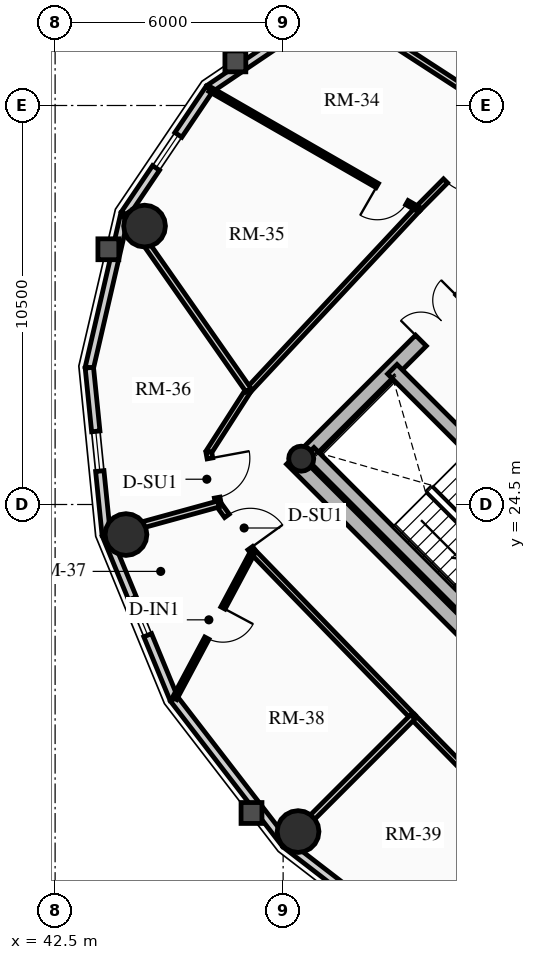
"""IFC4 building model, lengths in metres.
Left out: names, types, materials, properties, quantities, classifications, styles, units other than length and angle.
Written with IfcOpenShell. Run it as: python <this file> out.ifc"""

import sys

from ifc_helpers import new_model, si_unit, direction, frame, frame_2d, origin, origin_2d, place, context, subcontext, project, spatial, rectangle, circle, hollow_circle, extrude, source, transform, mapped, element, fill, save


model = new_model("IFC4")
c1 = context("Model", 3, precision=1e-05, world=origin(), true_north=direction((0.0, 1.0)))
c2 = subcontext(c1, "Body", "Model", "MODEL_VIEW")
j1 = project(units=[si_unit("LENGTHUNIT", "METRE"), si_unit("PLANEANGLEUNIT", "RADIAN")], contexts=[c1])
p1 = place(None, origin())
s1 = spatial("IfcSite", under=j1, at=p1, CompositionType="ELEMENT")
p2 = place(p1, origin())
s2 = spatial("IfcBuilding", under=s1, at=p2, CompositionType="ELEMENT")
p3 = place(p2, frame((0.0, 0.0, 211.21)))
s3 = spatial("IfcBuildingStorey", under=s2, at=p3, CompositionType="ELEMENT", Elevation=211.21)
p4 = place(p3, frame((58.702, 15.732, 0.0), z_axis=(0.0, 0.0, 1.0), x_axis=(-0.707106781187, 0.707106781187, 0.0)))
e1 = element("IfcWall", 1, at=p4, inside=s3, PredefinedType="SHEAR", context=c2, shape_type="SweptSolid", body=[
    extrude(rectangle(XDim=14.1, YDim=0.4, at=frame_2d((7.05, 0.0))), origin(), (0.0, 0.0, 1.0), 2.91),
])
p5 = place(p3, frame((48.873, 25.561, 0.0), z_axis=(0.0, 0.0, 1.0), x_axis=(0.707106781187, 0.707106781187, 0.0)))
e2 = element("IfcWall", 2, at=p5, inside=s3, PredefinedType="SHEAR", context=c2, shape_type="SweptSolid", body=[
    extrude(rectangle(XDim=10.7, YDim=0.4, at=frame_2d((5.35, 0.0))), origin(), (0.0, 0.0, 1.0), 2.91),
])
m1 = source(origin(), c2, "Body", "SweptSolid", [
    extrude(rectangle(XDim=1.5, YDim=2.02, at=frame_2d((0.75, 1.01))), frame((0.0, 0.21, 0.0), z_axis=(0.0, -1.0, 0.0), x_axis=(1.0, 0.0, 0.0)), (0.0, 0.0, 1.0), 0.42),
])
p6 = place(p5, frame((4.6, 0.0, 0.0)))
e3 = element("IfcOpeningElement", 3, at=p6, cuts=e2, PredefinedType="OPENING", context=c2, shape_type="MappedRepresentation", body=[
    mapped(m1, transform((0.0, 0.0, 0.0), x_axis=(1.0, 0.0, 0.0), y_axis=(0.0, 1.0, 0.0), z_axis=(0.0, 0.0, 1.0), scale=1.0)),
])
p7 = place(p3, frame((61.06, 18.373, 0.0), z_axis=(0.0, 0.0, 1.0), x_axis=(-0.707106781187, 0.707106781187, 0.0)))
e4 = element("IfcWall", 4, at=p7, inside=s3, PredefinedType="SHEAR", context=c2, shape_type="SweptSolid", body=[
    extrude(rectangle(XDim=13.7, YDim=0.35, at=frame_2d((6.85, 0.0))), origin(), (0.0, 0.0, 1.0), 2.91),
])
m2 = source(origin(), c2, "Body", "SweptSolid", [
    extrude(rectangle(XDim=1.1, YDim=2.015, at=frame_2d((0.55, 1.007))), frame((0.0, 0.185, 0.0), z_axis=(0.0, -1.0, 0.0), x_axis=(1.0, 0.0, 0.0)), (0.0, 0.0, 1.0), 0.37),
])
p8 = place(p7, frame((4.85, 0.0, 0.0)))
e5 = element("IfcOpeningElement", 5, at=p8, cuts=e4, PredefinedType="OPENING", context=c2, shape_type="MappedRepresentation", body=[
    mapped(m2, transform((0.0, 0.0, 0.0), x_axis=(1.0, 0.0, 0.0), y_axis=(0.0, 1.0, 0.0), z_axis=(0.0, 0.0, 1.0), scale=1.0)),
])
p9 = place(p7, frame((0.625, 0.0, 0.0)))
e6 = element("IfcOpeningElement", 6, at=p9, cuts=e4, PredefinedType="OPENING", context=c2, shape_type="MappedRepresentation", body=[
    mapped(m2, transform((0.0, 0.0, 0.0), x_axis=(1.0, 0.0, 0.0), y_axis=(0.0, 1.0, 0.0), z_axis=(0.0, 0.0, 1.0), scale=1.0)),
])
p10 = place(p7, frame((2.625, 0.0, 0.0)))
e7 = element("IfcOpeningElement", 7, at=p10, cuts=e4, PredefinedType="OPENING", context=c2, shape_type="MappedRepresentation", body=[
    mapped(m2, transform((0.0, 0.0, 0.0), x_axis=(1.0, 0.0, 0.0), y_axis=(0.0, 1.0, 0.0), z_axis=(0.0, 0.0, 1.0), scale=1.0)),
])
m3 = source(origin(), c2, "Body", "SweptSolid", [
    extrude(rectangle(XDim=1.15, YDim=2.02, at=frame_2d((0.575, 1.01))), frame((0.0, 0.185, 0.0), z_axis=(0.0, -1.0, 0.0), x_axis=(1.0, 0.0, 0.0)), (0.0, 0.0, 1.0), 0.37),
])
p11 = place(p7, frame((7.27, 0.0, 0.0)))
e8 = element("IfcOpeningElement", 8, at=p11, cuts=e4, PredefinedType="OPENING", context=c2, shape_type="MappedRepresentation", body=[
    mapped(m3, transform((0.0, 0.0, 0.0), x_axis=(1.0, 0.0, 0.0), y_axis=(0.0, 1.0, 0.0), z_axis=(0.0, 0.0, 1.0), scale=1.0)),
])
p12 = place(p3, frame((53.922, 21.141, 0.0), z_axis=(0.0, 0.0, 1.0), x_axis=(-0.707106781187, 0.707106781187, 0.0)))
e9 = element("IfcWall", 9, at=p12, inside=s3, PredefinedType="SHEAR", context=c2, shape_type="SweptSolid", body=[
    extrude(rectangle(XDim=6.695, YDim=0.35, at=frame_2d((3.348, 0.0))), origin(), (0.0, 0.0, 1.0), 2.91),
])
p13 = place(p3, frame((48.976, 25.706, 0.0), z_axis=(0.0, 0.0, 1.0), x_axis=(0.707106781187, 0.707106781187, 0.0)))
e10 = element("IfcColumn", 10, at=p13, inside=s3, PredefinedType="COLUMN", context=c2, shape_type="SweptSolid", body=[
    extrude(hollow_circle(Radius=0.33, WallThickness=0.025, at=origin_2d()), origin(), (0.0, 0.0, 1.0), 2.91),
])
for number, where, z_axis, x_axis in (
    (11, (44.854, 31.827, 0.0), (0.0, 0.0, 1.0), (1.0, 0.0, 0.0)),
    (12, (44.365, 23.709, 0.0), (0.0, 0.0, 1.0), (1.0, 0.0, 0.0)),
    (13, (48.893, 15.893, 0.0), (0.0, 0.0, 1.0), (1.0, 0.0, 0.0)),
):
    element("IfcColumn", number, at=place(p3, frame(where, z_axis=z_axis, x_axis=x_axis)), inside=s3, PredefinedType="USERDEFINED", context=c2, shape_type="SweptSolid", body=[
        extrude(circle(Radius=0.55, at=origin_2d()), origin(), (0.0, 0.0, 1.0), 2.91),
    ])
p14 = place(p3, frame((46.561, 35.439, 0.0), z_axis=(0.0, 0.0, 1.0), x_axis=(0.828833723692, 0.559495003079, 0.0)))
e14 = element("IfcWall", 14, at=p14, inside=s3, PredefinedType="SOLIDWALL", context=c2, shape_type="SweptSolid", body=[
    extrude(rectangle(XDim=3.976, YDim=0.22, at=frame_2d((1.988, 0.0))), origin(), (0.0, 0.0, 1.0), 2.322),
])
p15 = place(p3, frame((44.337, 32.144, 0.0), z_axis=(0.0, 0.0, 1.0), x_axis=(0.559495003079, 0.828833723692, 0.0)))
e15 = element("IfcWall", 15, at=p15, inside=s3, PredefinedType="SOLIDWALL", context=c2, shape_type="SweptSolid", body=[
    extrude(rectangle(XDim=3.976, YDim=0.22, at=frame_2d((1.988, 0.0))), origin(), (0.0, 0.0, 1.0), 2.322),
])
m4 = source(origin(), c2, "Body", "SweptSolid", [
    extrude(rectangle(XDim=1.05, YDim=1.3, at=frame_2d((0.525, 0.65))), frame((0.0, 0.12, 0.0), z_axis=(0.0, -1.0, 0.0), x_axis=(1.0, 0.0, 0.0)), (0.0, 0.0, 1.0), 0.24),
])
p16 = place(p15, frame((1.463, 0.0, 0.65)))
e16 = element("IfcOpeningElement", 16, at=p16, cuts=e15, PredefinedType="OPENING", context=c2, shape_type="MappedRepresentation", body=[
    mapped(m4, transform((0.0, 0.0, 0.0), x_axis=(1.0, 0.0, 0.0), y_axis=(0.0, 1.0, 0.0), z_axis=(0.0, 0.0, 1.0), scale=1.0)),
])
p17 = place(p3, frame((43.401, 28.1, 0.0), z_axis=(0.0, 0.0, 1.0), x_axis=(0.225473813158, 0.974249228678, 0.0)))
e17 = element("IfcWall", 17, at=p17, inside=s3, PredefinedType="SOLIDWALL", context=c2, shape_type="SweptSolid", body=[
    extrude(rectangle(XDim=4.15, YDim=0.22, at=frame_2d((2.075, 0.0))), origin(), (0.0, 0.0, 1.0), 2.322),
])
p18 = place(p3, frame((43.845, 23.705, 0.0), z_axis=(0.0, 0.0, 1.0), x_axis=(-0.100570534541, 0.994929930991, 0.0)))
e18 = element("IfcWall", 18, at=p18, inside=s3, PredefinedType="SOLIDWALL", context=c2, shape_type="SweptSolid", body=[
    extrude(rectangle(XDim=4.418, YDim=0.22, at=frame_2d((2.209, 0.0))), origin(), (0.0, 0.0, 1.0), 2.322),
])
p19 = place(p18, frame((1.684, 0.0, 0.65)))
e19 = element("IfcOpeningElement", 19, at=p19, cuts=e18, PredefinedType="OPENING", context=c2, shape_type="MappedRepresentation", body=[
    mapped(m4, transform((0.0, 0.0, 0.0), x_axis=(1.0, 0.0, 0.0), y_axis=(0.0, 1.0, 0.0), z_axis=(0.0, 0.0, 1.0), scale=1.0)),
])
p20 = place(p3, frame((45.626, 19.387, 0.0), z_axis=(0.0, 0.0, 1.0), x_axis=(-0.381309704956, 0.924447353237, 0.0)))
e20 = element("IfcWall", 20, at=p20, inside=s3, PredefinedType="SOLIDWALL", context=c2, shape_type="SweptSolid", body=[
    extrude(rectangle(XDim=4.671, YDim=0.22, at=frame_2d((2.335, 0.0))), origin(), (0.0, 0.0, 1.0), 2.322),
])
p21 = place(p20, frame((1.81, 0.0, 0.65)))
e21 = element("IfcOpeningElement", 21, at=p21, cuts=e20, PredefinedType="OPENING", context=c2, shape_type="MappedRepresentation", body=[
    mapped(m4, transform((0.0, 0.0, 0.0), x_axis=(1.0, 0.0, 0.0), y_axis=(0.0, 1.0, 0.0), z_axis=(0.0, 0.0, 1.0), scale=1.0)),
])
p22 = place(p3, frame((48.569, 15.569, 0.0), z_axis=(0.0, 0.0, 1.0), x_axis=(-0.610523083886, 0.791998462147, 0.0)))
e22 = element("IfcWall", 22, at=p22, inside=s3, PredefinedType="SOLIDWALL", context=c2, shape_type="SweptSolid", body=[
    extrude(rectangle(XDim=4.82, YDim=0.22, at=frame_2d((2.41, 0.0))), origin(), (0.0, 0.0, 1.0), 2.322),
])
p23 = place(p3, frame((52.387, 12.626, 0.0), z_axis=(0.0, 0.0, 1.0), x_axis=(-0.791998462147, 0.610523083886, 0.0)))
e23 = element("IfcWall", 23, at=p23, inside=s3, PredefinedType="SOLIDWALL", context=c2, shape_type="SweptSolid", body=[
    extrude(rectangle(XDim=4.82, YDim=0.22, at=frame_2d((2.41, 0.0))), origin(), (0.0, 0.0, 1.0), 2.322),
])
p24 = place(p23, frame((1.885, 0.0, 0.65)))
e24 = element("IfcOpeningElement", 24, at=p24, cuts=e23, PredefinedType="OPENING", context=c2, shape_type="MappedRepresentation", body=[
    mapped(m4, transform((0.0, 0.0, 0.0), x_axis=(1.0, 0.0, 0.0), y_axis=(0.0, 1.0, 0.0), z_axis=(0.0, 0.0, 1.0), scale=1.0)),
])
p25 = place(p3, frame((54.427, 34.683, 0.0), z_axis=(0.0, 0.0, 1.0), x_axis=(-0.704178989986, -0.710022499687, 0.0)))
e25 = element("IfcWall", 25, at=p25, inside=s3, PredefinedType="PARTITIONING", context=c2, shape_type="SweptSolid", body=[
    extrude(rectangle(XDim=3.384, YDim=0.15, at=frame_2d((1.692, 0.0))), origin(), (0.0, 0.0, 1.0), 2.322),
])
m5 = source(origin(), c2, "Body", "SweptSolid", [
    extrude(rectangle(XDim=1.05, YDim=2.015, at=frame_2d((0.525, 1.007))), frame((0.0, 0.085, 0.0), z_axis=(0.0, -1.0, 0.0), x_axis=(1.0, 0.0, 0.0)), (0.0, 0.0, 1.0), 0.17),
])
p26 = place(p25, frame((1.298, 0.0, 0.0)))
e26 = element("IfcOpeningElement", 26, at=p26, cuts=e25, PredefinedType="OPENING", context=c2, shape_type="MappedRepresentation", body=[
    mapped(m5, transform((0.0, 0.0, 0.0), x_axis=(1.0, 0.0, 0.0), y_axis=(0.0, 1.0, 0.0), z_axis=(0.0, 0.0, 1.0), scale=1.0)),
])
p27 = place(p3, frame((52.043, 32.28, 0.0), z_axis=(0.0, 0.0, 1.0), x_axis=(-0.682606081633, -0.730786519661, 0.0)))
e27 = element("IfcWall", 27, at=p27, inside=s3, PredefinedType="PARTITIONING", context=c2, shape_type="SweptSolid", body=[
    extrude(rectangle(XDim=6.527, YDim=0.15, at=frame_2d((3.263, 0.0))), origin(), (0.0, 0.0, 1.0), 2.255),
])
p28 = place(p3, frame((47.588, 27.51, 0.0), z_axis=(0.0, 0.0, 1.0), x_axis=(-0.540202619347, -0.841534984449, 0.0)))
e28 = element("IfcWall", 28, at=p28, inside=s3, PredefinedType="PARTITIONING", context=c2, shape_type="SweptSolid", body=[
    extrude(rectangle(XDim=1.935, YDim=0.15, at=frame_2d((0.967, 0.0))), origin(), (0.0, 0.0, 1.0), 2.255),
])
p29 = place(p3, frame((46.543, 25.882, 0.0), z_axis=(0.0, 0.0, 1.0), x_axis=(0.181153502579, -0.983454832976, 0.0)))
e29 = element("IfcWall", 29, at=p29, inside=s3, PredefinedType="PARTITIONING", context=c2, shape_type="SweptSolid", body=[
    extrude(rectangle(XDim=1.392, YDim=0.15, at=frame_2d((0.696, 0.0))), origin(), (0.0, 0.0, 1.0), 2.322),
])
p30 = place(p29, frame((0.171, 0.0, 0.0)))
e30 = element("IfcOpeningElement", 30, at=p30, cuts=e29, PredefinedType="OPENING", context=c2, shape_type="MappedRepresentation", body=[
    mapped(m5, transform((0.0, 0.0, 0.0), x_axis=(1.0, 0.0, 0.0), y_axis=(0.0, 1.0, 0.0), z_axis=(0.0, 0.0, 1.0), scale=1.0)),
])
p31 = place(p3, frame((46.795, 24.513, 0.0), z_axis=(0.0, 0.0, 1.0), x_axis=(0.585628197524, -0.810579801294, 0.0)))
e31 = element("IfcWall", 31, at=p31, inside=s3, PredefinedType="PARTITIONING", context=c2, shape_type="SweptSolid", body=[
    extrude(rectangle(XDim=1.554, YDim=0.15, at=frame_2d((0.777, 0.0))), origin(), (0.0, 0.0, 1.0), 2.255),
])
p32 = place(p31, frame((0.384, 0.0, 0.0)))
e32 = element("IfcOpeningElement", 32, at=p32, cuts=e31, PredefinedType="OPENING", context=c2, shape_type="MappedRepresentation", body=[
    mapped(m5, transform((0.0, 0.0, 0.0), x_axis=(1.0, 0.0, 0.0), y_axis=(0.0, 1.0, 0.0), z_axis=(0.0, 0.0, 1.0), scale=1.0)),
])
p33 = place(p3, frame((47.706, 23.253, 0.0), z_axis=(0.0, 0.0, 1.0), x_axis=(0.696179266346, -0.717867974707, 0.0)))
e33 = element("IfcWall", 33, at=p33, inside=s3, PredefinedType="PARTITIONING", context=c2, shape_type="SweptSolid", body=[
    extrude(rectangle(XDim=6.045, YDim=0.15, at=frame_2d((3.022, 0.0))), origin(), (0.0, 0.0, 1.0), 2.255),
])
p34 = place(p3, frame((51.914, 18.914, 0.0), z_axis=(0.0, 0.0, 1.0), x_axis=(0.699999313799, -0.714143515465, 0.0)))
e34 = element("IfcWall", 34, at=p34, inside=s3, PredefinedType="PARTITIONING", context=c2, shape_type="SweptSolid", body=[
    extrude(rectangle(XDim=6.162, YDim=0.15, at=frame_2d((3.081, 0.0))), origin(), (0.0, 0.0, 1.0), 2.255),
])
p35 = place(p3, frame((54.427, 34.683, 0.0), z_axis=(0.0, 0.0, 1.0), x_axis=(-0.83860663594, 0.544737469023, 0.0)))
e35 = element("IfcWall", 35, at=p35, inside=s3, PredefinedType="PARTITIONING", context=c2, shape_type="SweptSolid", body=[
    extrude(rectangle(XDim=5.439, YDim=0.16, at=frame_2d((2.72, 0.0))), origin(), (0.0, 0.0, 1.0), 2.322),
])
p36 = place(p3, frame((47.588, 27.51, 0.0), z_axis=(0.0, 0.0, 1.0), x_axis=(-0.573073195236, 0.819504187239, 0.0)))
e36 = element("IfcWall", 36, at=p36, inside=s3, PredefinedType="PARTITIONING", context=c2, shape_type="SweptSolid", body=[
    extrude(rectangle(XDim=5.643, YDim=0.16, at=frame_2d((2.822, 0.0))), origin(), (0.0, 0.0, 1.0), 2.322),
])
p37 = place(p3, frame((46.795, 24.513, 0.0), z_axis=(0.0, 0.0, 1.0), x_axis=(-0.964263392178, -0.264945485912, 0.0)))
e37 = element("IfcWall", 37, at=p37, inside=s3, PredefinedType="PARTITIONING", context=c2, shape_type="SweptSolid", body=[
    extrude(rectangle(XDim=3.039, YDim=0.16, at=frame_2d((1.52, 0.0))), origin(), (0.0, 0.0, 1.0), 2.322),
])
p38 = place(p3, frame((51.914, 18.914, 0.0), z_axis=(0.0, 0.0, 1.0), x_axis=(-0.707106781187, -0.707106781187, 0.0)))
e38 = element("IfcWall", 38, at=p38, inside=s3, PredefinedType="PARTITIONING", context=c2, shape_type="SweptSolid", body=[
    extrude(rectangle(XDim=4.71, YDim=0.16, at=frame_2d((2.355, 0.0))), origin(), (0.0, 0.0, 1.0), 2.322),
])
p39 = place(p3, frame((52.043, 32.28, 0.0), z_axis=(0.0, 0.0, 1.0), x_axis=(-0.866853616581, 0.498562741709, 0.0)))
e39 = element("IfcWall", 39, at=p39, inside=s3, PredefinedType="PARTITIONING", context=c2, shape_type="SweptSolid", body=[
    extrude(rectangle(XDim=6.308, YDim=0.125, at=frame_2d((3.154, 0.0))), origin(), (0.0, 0.0, 1.0), 2.322),
])
m6 = source(origin(), c2, "Body", "SweptSolid", [
    extrude(rectangle(XDim=0.9, YDim=2.005, at=frame_2d((0.45, 1.002))), frame((0.0, 0.073, 0.0), z_axis=(0.0, -1.0, 0.0), x_axis=(1.0, 0.0, 0.0)), (0.0, 0.0, 1.0), 0.145),
])
p40 = place(p39, frame((0.33, 0.0, 0.0)))
e40 = element("IfcOpeningElement", 40, at=p40, cuts=e39, PredefinedType="OPENING", context=c2, shape_type="MappedRepresentation", body=[
    mapped(m6, transform((0.0, 0.0, 0.0), x_axis=(1.0, 0.0, 0.0), y_axis=(0.0, 1.0, 0.0), z_axis=(0.0, 0.0, 1.0), scale=1.0)),
])
p41 = place(p3, frame((47.706, 23.253, 0.0), z_axis=(0.0, 0.0, 1.0), x_axis=(-0.471384756618, -0.881927667799, 0.0)))
e41 = element("IfcWall", 41, at=p41, inside=s3, PredefinedType="PARTITIONING", context=c2, shape_type="SweptSolid", body=[
    extrude(rectangle(XDim=4.374, YDim=0.125, at=frame_2d((2.187, 0.0))), origin(), (0.0, 0.0, 1.0), 2.255),
])
p42 = place(p41, frame((1.674, 0.0, 0.0)))
e42 = element("IfcOpeningElement", 42, at=p42, cuts=e41, PredefinedType="OPENING", context=c2, shape_type="MappedRepresentation", body=[
    mapped(m6, transform((0.0, 0.0, 0.0), x_axis=(1.0, 0.0, 0.0), y_axis=(0.0, 1.0, 0.0), z_axis=(0.0, 0.0, 1.0), scale=1.0)),
])
m7 = source(origin(), c2, "Body", "SweptSolid", [
    extrude(rectangle(XDim=1.05, YDim=1.3, at=frame_2d((0.525, 0.65))), frame((0.0, 0.03, 0.0), z_axis=(0.0, -1.0, 0.0), x_axis=(1.0, 0.0, 0.0)), (0.0, 0.0, 1.0), 0.06),
])
p43 = place(p16, origin())
e43 = element("IfcWindow", 43, at=p43, inside=s3, PartitioningType="SINGLE_PANEL", PredefinedType="WINDOW", context=c2, shape_type="MappedRepresentation", body=[
    mapped(m7, transform((0.0, 0.0, 0.0), x_axis=(1.0, 0.0, 0.0), y_axis=(0.0, 1.0, 0.0), z_axis=(0.0, 0.0, 1.0), scale=1.0)),
])
fill(e16, e43)
p44 = place(p19, origin())
e44 = element("IfcWindow", 44, at=p44, inside=s3, PartitioningType="SINGLE_PANEL", PredefinedType="WINDOW", context=c2, shape_type="MappedRepresentation", body=[
    mapped(m7, transform((0.0, 0.0, 0.0), x_axis=(1.0, 0.0, 0.0), y_axis=(0.0, 1.0, 0.0), z_axis=(0.0, 0.0, 1.0), scale=1.0)),
])
fill(e19, e44)
p45 = place(p21, origin())
e45 = element("IfcWindow", 45, at=p45, inside=s3, PartitioningType="SINGLE_PANEL", PredefinedType="WINDOW", context=c2, shape_type="MappedRepresentation", body=[
    mapped(m7, transform((0.0, 0.0, 0.0), x_axis=(1.0, 0.0, 0.0), y_axis=(0.0, 1.0, 0.0), z_axis=(0.0, 0.0, 1.0), scale=1.0)),
])
fill(e21, e45)
m8 = source(origin(), c2, "Body", "SweptSolid", [
    extrude(rectangle(XDim=1.5, YDim=2.02, at=frame_2d((0.75, 1.01))), frame((0.0, 0.025, 0.0), z_axis=(0.0, -1.0, 0.0), x_axis=(1.0, 0.0, 0.0)), (0.0, 0.0, 1.0), 0.05),
])
p46 = place(p6, origin())
e46 = element("IfcDoor", 46, at=p46, inside=s3, OperationType="DOUBLE_DOOR_SINGLE_SWING", PredefinedType="DOOR", context=c2, shape_type="MappedRepresentation", body=[
    mapped(m8, transform((0.0, 0.0, 0.0), x_axis=(1.0, 0.0, 0.0), y_axis=(0.0, 1.0, 0.0), z_axis=(0.0, 0.0, 1.0), scale=1.0)),
])
fill(e3, e46)
m9 = source(origin(), c2, "Body", "SweptSolid", [
    extrude(rectangle(XDim=1.05, YDim=2.015, at=frame_2d((0.525, 1.007))), frame((0.0, 0.025, 0.0), z_axis=(0.0, -1.0, 0.0), x_axis=(1.0, 0.0, 0.0)), (0.0, 0.0, 1.0), 0.05),
])
p47 = place(p26, origin())
e47 = element("IfcDoor", 47, at=p47, inside=s3, OperationType="SINGLE_SWING_LEFT", PredefinedType="DOOR", context=c2, shape_type="MappedRepresentation", body=[
    mapped(m9, transform((0.0, 0.0, 0.0), x_axis=(1.0, 0.0, 0.0), y_axis=(0.0, 1.0, 0.0), z_axis=(0.0, 0.0, 1.0), scale=1.0)),
])
fill(e26, e47)
m10 = source(origin(), c2, "Body", "SweptSolid", [
    extrude(rectangle(XDim=0.9, YDim=2.005, at=frame_2d((0.45, 1.002))), frame((0.0, 0.025, 0.0), z_axis=(0.0, -1.0, 0.0), x_axis=(1.0, 0.0, 0.0)), (0.0, 0.0, 1.0), 0.05),
])
p48 = place(p40, origin())
e48 = element("IfcDoor", 48, at=p48, inside=s3, OperationType="SINGLE_SWING_RIGHT", PredefinedType="DOOR", context=c2, shape_type="MappedRepresentation", body=[
    mapped(m10, transform((0.0, 0.0, 0.0), x_axis=(1.0, 0.0, 0.0), y_axis=(0.0, 1.0, 0.0), z_axis=(0.0, 0.0, 1.0), scale=1.0)),
])
fill(e40, e48)
p49 = place(p30, origin())
e49 = element("IfcDoor", 49, at=p49, inside=s3, OperationType="SINGLE_SWING_LEFT", PredefinedType="DOOR", context=c2, shape_type="MappedRepresentation", body=[
    mapped(m9, transform((0.0, 0.0, 0.0), x_axis=(1.0, 0.0, 0.0), y_axis=(0.0, 1.0, 0.0), z_axis=(0.0, 0.0, 1.0), scale=1.0)),
])
fill(e30, e49)
p50 = place(p32, origin())
e50 = element("IfcDoor", 50, at=p50, inside=s3, OperationType="SINGLE_SWING_RIGHT", PredefinedType="DOOR", context=c2, shape_type="MappedRepresentation", body=[
    mapped(m9, transform((0.0, 0.0, 0.0), x_axis=(1.0, 0.0, 0.0), y_axis=(0.0, 1.0, 0.0), z_axis=(0.0, 0.0, 1.0), scale=1.0)),
])
fill(e32, e50)
p51 = place(p42, origin())
e51 = element("IfcDoor", 51, at=p51, inside=s3, OperationType="SINGLE_SWING_LEFT", PredefinedType="DOOR", context=c2, shape_type="MappedRepresentation", body=[
    mapped(m10, transform((0.0, 0.0, 0.0), x_axis=(1.0, 0.0, 0.0), y_axis=(0.0, 1.0, 0.0), z_axis=(0.0, 0.0, 1.0), scale=1.0)),
])
fill(e42, e51)
save(model, sys.argv[1])
